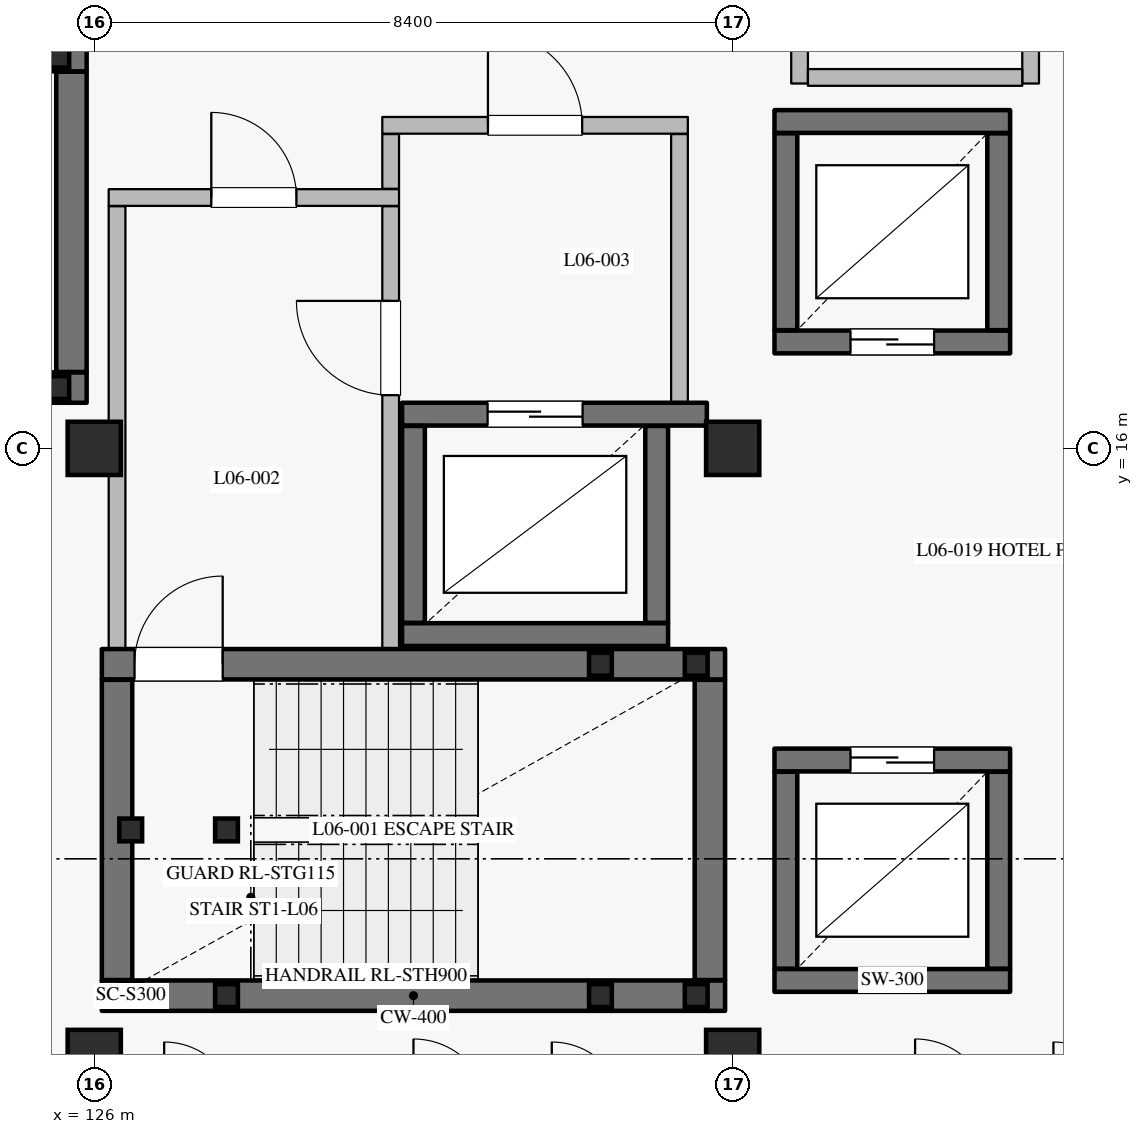
"""IFC4 building model, lengths in metres.
Left out: names, types, materials, properties, quantities, classifications, styles, units other than length and angle.
Written with IfcOpenShell. Run it as: python <this file> out.ifc"""

import sys

from ifc_helpers import new_model, si_unit, direction, frame, frame_2d, origin, origin_2d, place, context, subcontext, project, spatial, rectangle, hollow_rectangle, extrude, element, fill, save


model = new_model("IFC4")
c1 = context("Model", 3, precision=1e-05, world=origin(), true_north=direction((0.0, 1.0)))
c2 = subcontext(c1, "Body", "Model", "MODEL_VIEW")
j1 = project(units=[si_unit("LENGTHUNIT", "METRE"), si_unit("PLANEANGLEUNIT", "RADIAN")], contexts=[c1])
p1 = place(None, origin())
s1 = spatial("IfcSite", under=j1, at=p1, CompositionType="ELEMENT")
p2 = place(p1, origin())
s2 = spatial("IfcBuilding", under=s1, at=p2, CompositionType="ELEMENT")
p3 = place(p2, frame((0.0, 0.0, 28.8)))
s3 = spatial("IfcBuildingStorey", under=s2, at=p3, CompositionType="ELEMENT", Elevation=28.8)
for number, where, z_axis, x_axis in (
    (1, (126.0, 16.0, 0.0), (0.0, 0.0, 1.0), (1.0, 0.0, 0.0)),
    (2, (134.4, 16.0, 0.0), (0.0, 0.0, 1.0), (1.0, 0.0, 0.0)),
    (3, (126.0, 8.0, 0.0), (0.0, 0.0, 1.0), (1.0, 0.0, 0.0)),
    (4, (134.4, 8.0, 0.0), (0.0, 0.0, 1.0), (1.0, 0.0, 0.0)),
):
    element("IfcColumn", number, at=place(p3, frame(where, z_axis=z_axis, x_axis=x_axis)), inside=s3, PredefinedType="COLUMN", context=c2, shape_type="SweptSolid", body=[
        extrude(rectangle(XDim=0.7, YDim=0.7, at=origin_2d()), origin(), (0.0, 0.0, 1.0), 3.6),
    ])
p4 = place(p3, frame((134.95, 17.4, 0.0), z_axis=(0.0, 0.0, 1.0), x_axis=(1.0, 0.0, 0.0)))
e5 = element("IfcWall", 5, at=p4, inside=s3, PredefinedType="SHEAR", context=c2, shape_type="SweptSolid", body=[
    extrude(rectangle(XDim=3.1, YDim=0.3, at=frame_2d((1.55, 0.0))), origin(), (0.0, 0.0, 1.0), 3.365),
])
p5 = place(p4, frame((1.0, 0.0, 0.0)))
e6 = element("IfcOpeningElement", 6, at=p5, cuts=e5, PredefinedType="OPENING", context=c2, shape_type="SweptSolid", body=[
    extrude(rectangle(XDim=1.1, YDim=2.2, at=frame_2d((0.55, 1.1))), frame((0.0, 0.16, 0.0), z_axis=(0.0, -1.0, 0.0), x_axis=(1.0, 0.0, 0.0)), (0.0, 0.0, 1.0), 0.32),
])
p6 = place(p3, frame((137.9, 17.555, 0.0), z_axis=(0.0, 0.0, 1.0), x_axis=(0.0, 1.0, 0.0)))
e7 = element("IfcWall", 7, at=p6, inside=s3, PredefinedType="SHEAR", context=c2, shape_type="SweptSolid", body=[
    extrude(rectangle(XDim=2.59, YDim=0.3, at=frame_2d((1.295, 0.0))), origin(), (0.0, 0.0, 1.0), 3.365),
])
p7 = place(p3, frame((138.05, 20.3, 0.0), z_axis=(0.0, 0.0, 1.0), x_axis=(-1.0, 0.0, 0.0)))
e8 = element("IfcWall", 8, at=p7, inside=s3, PredefinedType="SHEAR", context=c2, shape_type="SweptSolid", body=[
    extrude(rectangle(XDim=3.1, YDim=0.3, at=frame_2d((1.55, 0.0))), origin(), (0.0, 0.0, 1.0), 3.365),
])
p8 = place(p3, frame((135.1, 20.145, 0.0), z_axis=(0.0, 0.0, 1.0), x_axis=(0.0, -1.0, 0.0)))
e9 = element("IfcWall", 9, at=p8, inside=s3, PredefinedType="SHEAR", context=c2, shape_type="SweptSolid", body=[
    extrude(rectangle(XDim=2.59, YDim=0.3, at=frame_2d((1.295, 0.0))), origin(), (0.0, 0.0, 1.0), 3.365),
])
p9 = place(p3, frame((134.95, 9.0, 0.0), z_axis=(0.0, 0.0, 1.0), x_axis=(1.0, 0.0, 0.0)))
e10 = element("IfcWall", 10, at=p9, inside=s3, PredefinedType="SHEAR", context=c2, shape_type="SweptSolid", body=[
    extrude(rectangle(XDim=3.1, YDim=0.3, at=frame_2d((1.55, 0.0))), origin(), (0.0, 0.0, 1.0), 3.365),
])
p10 = place(p3, frame((137.9, 9.155, 0.0), z_axis=(0.0, 0.0, 1.0), x_axis=(0.0, 1.0, 0.0)))
e11 = element("IfcWall", 11, at=p10, inside=s3, PredefinedType="SHEAR", context=c2, shape_type="SweptSolid", body=[
    extrude(rectangle(XDim=2.59, YDim=0.3, at=frame_2d((1.295, 0.0))), origin(), (0.0, 0.0, 1.0), 3.365),
])
p11 = place(p3, frame((138.05, 11.9, 0.0), z_axis=(0.0, 0.0, 1.0), x_axis=(-1.0, 0.0, 0.0)))
e12 = element("IfcWall", 12, at=p11, inside=s3, PredefinedType="SHEAR", context=c2, shape_type="SweptSolid", body=[
    extrude(rectangle(XDim=3.1, YDim=0.3, at=frame_2d((1.55, 0.0))), origin(), (0.0, 0.0, 1.0), 3.365),
])
p12 = place(p11, frame((1.0, 0.0, 0.0)))
e13 = element("IfcOpeningElement", 13, at=p12, cuts=e12, PredefinedType="OPENING", context=c2, shape_type="SweptSolid", body=[
    extrude(rectangle(XDim=1.1, YDim=2.2, at=frame_2d((0.55, 1.1))), frame((0.0, 0.16, 0.0), z_axis=(0.0, -1.0, 0.0), x_axis=(1.0, 0.0, 0.0)), (0.0, 0.0, 1.0), 0.32),
])
p13 = place(p3, frame((135.1, 11.745, 0.0), z_axis=(0.0, 0.0, 1.0), x_axis=(0.0, -1.0, 0.0)))
e14 = element("IfcWall", 14, at=p13, inside=s3, PredefinedType="SHEAR", context=c2, shape_type="SweptSolid", body=[
    extrude(rectangle(XDim=2.59, YDim=0.3, at=frame_2d((1.295, 0.0))), origin(), (0.0, 0.0, 1.0), 3.365),
])
p14 = place(p3, frame((130.05, 13.55, 0.0), z_axis=(0.0, 0.0, 1.0), x_axis=(1.0, 0.0, 0.0)))
e15 = element("IfcWall", 15, at=p14, inside=s3, PredefinedType="SHEAR", context=c2, shape_type="SweptSolid", body=[
    extrude(rectangle(XDim=3.5, YDim=0.3, at=frame_2d((1.75, 0.0))), origin(), (0.0, 0.0, 1.0), 3.365),
])
p15 = place(p3, frame((133.4, 13.705, 0.0), z_axis=(0.0, 0.0, 1.0), x_axis=(0.0, 1.0, 0.0)))
e16 = element("IfcWall", 16, at=p15, inside=s3, PredefinedType="SHEAR", context=c2, shape_type="SweptSolid", body=[
    extrude(rectangle(XDim=2.59, YDim=0.3, at=frame_2d((1.295, 0.0))), origin(), (0.0, 0.0, 1.0), 3.365),
])
p16 = place(p3, frame((134.06, 16.45, 0.0), z_axis=(0.0, 0.0, 1.0), x_axis=(-1.0, 0.0, 0.0)))
e17 = element("IfcWall", 17, at=p16, inside=s3, PredefinedType="SHEAR", context=c2, shape_type="SweptSolid", body=[
    extrude(rectangle(XDim=4.01, YDim=0.3, at=frame_2d((2.005, 0.0))), origin(), (0.0, 0.0, 1.0), 3.365),
])
p17 = place(p16, frame((1.635, 0.0, 0.0)))
e18 = element("IfcOpeningElement", 18, at=p17, cuts=e17, PredefinedType="OPENING", context=c2, shape_type="SweptSolid", body=[
    extrude(rectangle(XDim=1.25, YDim=2.25, at=frame_2d((0.625, 1.125))), frame((0.0, 0.16, 0.0), z_axis=(0.0, -1.0, 0.0), x_axis=(1.0, 0.0, 0.0)), (0.0, 0.0, 1.0), 0.32),
])
p18 = place(p3, frame((130.2, 16.295, 0.0), z_axis=(0.0, 0.0, 1.0), x_axis=(0.0, -1.0, 0.0)))
e19 = element("IfcWall", 19, at=p18, inside=s3, PredefinedType="SHEAR", context=c2, shape_type="SweptSolid", body=[
    extrude(rectangle(XDim=2.59, YDim=0.3, at=frame_2d((1.295, 0.0))), origin(), (0.0, 0.0, 1.0), 3.365),
])
p19 = place(p3, frame((126.1, 8.8, 0.0), z_axis=(0.0, 0.0, 1.0), x_axis=(1.0, 0.0, 0.0)))
e20 = element("IfcWall", 20, at=p19, inside=s3, PredefinedType="SHEAR", context=c2, shape_type="SweptSolid", body=[
    extrude(rectangle(XDim=8.2, YDim=0.4, at=frame_2d((4.1, 0.0))), origin(), (0.0, 0.0, 1.0), 3.365),
])
p20 = place(p3, frame((134.1, 9.005, 0.0), z_axis=(0.0, 0.0, 1.0), x_axis=(0.0, 1.0, 0.0)))
e21 = element("IfcWall", 21, at=p20, inside=s3, PredefinedType="SHEAR", context=c2, shape_type="SweptSolid", body=[
    extrude(rectangle(XDim=3.95, YDim=0.4, at=frame_2d((1.975, 0.0))), origin(), (0.0, 0.0, 1.0), 3.365),
])
p21 = place(p3, frame((126.1, 13.16, 0.0), z_axis=(0.0, 0.0, 1.0), x_axis=(1.0, 0.0, 0.0)))
e22 = element("IfcWall", 22, at=p21, inside=s3, PredefinedType="SHEAR", context=c2, shape_type="SweptSolid", body=[
    extrude(rectangle(XDim=8.2, YDim=0.4, at=frame_2d((4.1, 0.0))), origin(), (0.0, 0.0, 1.0), 3.365),
])
p22 = place(p21, frame((0.43, 0.0, 0.0)))
e23 = element("IfcOpeningElement", 23, at=p22, cuts=e22, PredefinedType="OPENING", context=c2, shape_type="SweptSolid", body=[
    extrude(rectangle(XDim=1.16, YDim=2.2, at=frame_2d((0.58, 1.1))), frame((0.0, 0.21, 0.0), z_axis=(0.0, -1.0, 0.0), x_axis=(1.0, 0.0, 0.0)), (0.0, 0.0, 1.0), 0.42),
])
p23 = place(p3, frame((126.3, 9.005, 0.0), z_axis=(0.0, 0.0, 1.0), x_axis=(0.0, 1.0, 0.0)))
e24 = element("IfcWall", 24, at=p23, inside=s3, PredefinedType="SHEAR", context=c2, shape_type="SweptSolid", body=[
    extrude(rectangle(XDim=3.95, YDim=0.4, at=frame_2d((1.975, 0.0))), origin(), (0.0, 0.0, 1.0), 3.365),
])
p24 = place(p3, frame((126.3, 13.365, 0.0), z_axis=(0.0, 0.0, 1.0), x_axis=(0.0, 1.0, 0.0)))
e25 = element("IfcWall", 25, at=p24, inside=s3, PredefinedType="PARTITIONING", context=c2, shape_type="SweptSolid", body=[
    extrude(rectangle(XDim=5.82, YDim=0.22, at=frame_2d((2.91, 0.0))), origin(), (0.0, 0.0, 1.0), 3.365),
])
p25 = place(p3, frame((126.19, 19.3, 0.0), z_axis=(0.0, 0.0, 1.0), x_axis=(1.0, 0.0, 0.0)))
e26 = element("IfcWall", 26, at=p25, inside=s3, PredefinedType="PARTITIONING", context=c2, shape_type="SweptSolid", body=[
    extrude(rectangle(XDim=3.82, YDim=0.22, at=frame_2d((1.91, 0.0))), origin(), (0.0, 0.0, 1.0), 3.365),
])
p26 = place(p25, frame((1.35, 0.0, 0.0)))
e27 = element("IfcOpeningElement", 27, at=p26, cuts=e26, PredefinedType="OPENING", context=c2, shape_type="SweptSolid", body=[
    extrude(rectangle(XDim=1.12, YDim=2.2, at=frame_2d((0.56, 1.1))), frame((0.0, 0.12, 0.0), z_axis=(0.0, -1.0, 0.0), x_axis=(1.0, 0.0, 0.0)), (0.0, 0.0, 1.0), 0.24),
])
p27 = place(p3, frame((129.9, 13.365, 0.0), z_axis=(0.0, 0.0, 1.0), x_axis=(0.0, 1.0, 0.0)))
e28 = element("IfcWall", 28, at=p27, inside=s3, PredefinedType="PARTITIONING", context=c2, shape_type="SweptSolid", body=[
    extrude(rectangle(XDim=5.82, YDim=0.22, at=frame_2d((2.91, 0.0))), origin(), (0.0, 0.0, 1.0), 3.365),
])
p28 = place(p27, frame((3.335, 0.0, 0.0)))
e29 = element("IfcOpeningElement", 29, at=p28, cuts=e28, PredefinedType="OPENING", context=c2, shape_type="SweptSolid", body=[
    extrude(rectangle(XDim=1.24, YDim=2.2, at=frame_2d((0.62, 1.1))), frame((0.0, 0.12, 0.0), z_axis=(0.0, -1.0, 0.0), x_axis=(1.0, 0.0, 0.0)), (0.0, 0.0, 1.0), 0.24),
])
p29 = place(p3, frame((129.9, 19.415, 0.0), z_axis=(0.0, 0.0, 1.0), x_axis=(0.0, 1.0, 0.0)))
e30 = element("IfcWall", 30, at=p29, inside=s3, PredefinedType="PARTITIONING", context=c2, shape_type="SweptSolid", body=[
    extrude(rectangle(XDim=0.72, YDim=0.22, at=frame_2d((0.36, 0.0))), origin(), (0.0, 0.0, 1.0), 3.365),
])
p30 = place(p3, frame((133.7, 16.605, 0.0), z_axis=(0.0, 0.0, 1.0), x_axis=(0.0, 1.0, 0.0)))
e31 = element("IfcWall", 31, at=p30, inside=s3, PredefinedType="PARTITIONING", context=c2, shape_type="SweptSolid", body=[
    extrude(rectangle(XDim=3.53, YDim=0.22, at=frame_2d((1.765, 0.0))), origin(), (0.0, 0.0, 1.0), 3.365),
])
p31 = place(p3, frame((129.79, 20.25, 0.0), z_axis=(0.0, 0.0, 1.0), x_axis=(1.0, 0.0, 0.0)))
e32 = element("IfcWall", 32, at=p31, inside=s3, PredefinedType="PARTITIONING", context=c2, shape_type="SweptSolid", body=[
    extrude(rectangle(XDim=4.02, YDim=0.22, at=frame_2d((2.01, 0.0))), origin(), (0.0, 0.0, 1.0), 3.365),
])
p32 = place(p31, frame((1.39, 0.0, 0.0)))
e33 = element("IfcOpeningElement", 33, at=p32, cuts=e32, PredefinedType="OPENING", context=c2, shape_type="SweptSolid", body=[
    extrude(rectangle(XDim=1.24, YDim=2.2, at=frame_2d((0.62, 1.1))), frame((0.0, 0.12, 0.0), z_axis=(0.0, -1.0, 0.0), x_axis=(1.0, 0.0, 0.0)), (0.0, 0.0, 1.0), 0.24),
])
for number, where, z_axis, x_axis in (
    (34, (126.48, 8.8, 0.0), (0.0, 0.0, 1.0), (1.0, 0.0, 0.0)),
    (35, (126.48, 10.98, 0.0), (0.0, 0.0, 1.0), (1.0, 0.0, 0.0)),
    (36, (127.74, 8.8, 0.0), (0.0, 0.0, 1.0), (1.0, 0.0, 0.0)),
    (37, (127.74, 10.98, 0.0), (0.0, 0.0, 1.0), (1.0, 0.0, 0.0)),
    (38, (132.66, 8.8, -1.8), (0.0, 0.0, 1.0), (1.0, 0.0, 0.0)),
    (39, (132.66, 13.16, -1.8), (0.0, 0.0, 1.0), (1.0, 0.0, 0.0)),
    (40, (133.92, 8.8, -1.8), (0.0, 0.0, 1.0), (1.0, 0.0, 0.0)),
    (41, (133.92, 13.16, -1.8), (0.0, 0.0, 1.0), (1.0, 0.0, 0.0)),
):
    element("IfcColumn", number, at=place(p3, frame(where, z_axis=z_axis, x_axis=x_axis)), inside=s3, PredefinedType="COLUMN", context=c2, shape_type="SweptSolid", body=[
        extrude(hollow_rectangle(XDim=0.3, YDim=0.3, WallThickness=0.012, at=origin_2d()), origin(), (0.0, 0.0, 1.0), 3.42),
    ])
p33 = place(p3, frame((117.75, 16.8, 0.0), z_axis=(0.0, 0.0, 1.0), x_axis=(1.0, 0.0, 0.0)))
e42 = element("IfcWall", 42, at=p33, inside=s3, PredefinedType="SHEAR", context=c2, shape_type="SweptSolid", body=[
    extrude(rectangle(XDim=8.15, YDim=0.4, at=frame_2d((4.075, 0.0))), origin(), (0.0, 0.0, 1.0), 3.365),
])
p34 = place(p3, frame((125.7, 17.005, 0.0), z_axis=(0.0, 0.0, 1.0), x_axis=(0.0, 1.0, 0.0)))
e43 = element("IfcWall", 43, at=p34, inside=s3, PredefinedType="SHEAR", context=c2, shape_type="SweptSolid", body=[
    extrude(rectangle(XDim=3.95, YDim=0.4, at=frame_2d((1.975, 0.0))), origin(), (0.0, 0.0, 1.0), 3.365),
])
p35 = place(p3, frame((117.75, 21.16, 0.0), z_axis=(0.0, 0.0, 1.0), x_axis=(1.0, 0.0, 0.0)))
e44 = element("IfcWall", 44, at=p35, inside=s3, PredefinedType="SHEAR", context=c2, shape_type="SweptSolid", body=[
    extrude(rectangle(XDim=8.15, YDim=0.4, at=frame_2d((4.075, 0.0))), origin(), (0.0, 0.0, 1.0), 3.365),
])
p36 = place(p35, frame((0.38, 0.0, 0.0)))
e45 = element("IfcOpeningElement", 45, at=p36, cuts=e44, PredefinedType="OPENING", context=c2, shape_type="SweptSolid", body=[
    extrude(rectangle(XDim=1.16, YDim=2.2, at=frame_2d((0.58, 1.1))), frame((0.0, 0.21, 0.0), z_axis=(0.0, -1.0, 0.0), x_axis=(1.0, 0.0, 0.0)), (0.0, 0.0, 1.0), 0.42),
])
for number, where, z_axis, x_axis in (
    (46, (125.52, 16.8, -1.8), (0.0, 0.0, 1.0), (1.0, 0.0, 0.0)),
    (47, (125.52, 21.16, -1.8), (0.0, 0.0, 1.0), (1.0, 0.0, 0.0)),
):
    element("IfcColumn", number, at=place(p3, frame(where, z_axis=z_axis, x_axis=x_axis)), inside=s3, PredefinedType="COLUMN", context=c2, shape_type="SweptSolid", body=[
        extrude(hollow_rectangle(XDim=0.3, YDim=0.3, WallThickness=0.012, at=origin_2d()), origin(), (0.0, 0.0, 1.0), 3.42),
    ])
for number, where, z_axis, x_axis in (
    (48, (135.28, 20.8, 0.0), (0.0, 0.0, 1.0), (0.0, 1.0, 0.0)),
    (49, (138.32, 20.8, 0.0), (0.0, 0.0, 1.0), (0.0, 1.0, 0.0)),
):
    element("IfcWall", number, at=place(p3, frame(where, z_axis=z_axis, x_axis=x_axis)), inside=s3, PredefinedType="PARTITIONING", context=c2, shape_type="SweptSolid", body=[
        extrude(rectangle(XDim=2.748, YDim=0.22, at=frame_2d((1.374, 0.0))), origin(), (0.0, 0.0, 1.0), 3.365),
    ])
p37 = place(p3, frame((135.39, 20.88, 0.0), z_axis=(0.0, 0.0, 1.0), x_axis=(1.0, 0.0, 0.0)))
e50 = element("IfcWall", 50, at=p37, inside=s3, PredefinedType="PARTITIONING", context=c2, shape_type="SweptSolid", body=[
    extrude(rectangle(XDim=2.82, YDim=0.22, at=frame_2d((1.41, 0.0))), origin(), (0.0, 0.0, 1.0), 3.365),
])
p38 = place(p5, origin())
e51 = element("IfcDoor", 51, at=p38, inside=s3, OperationType="DOUBLE_DOOR_SLIDING", PredefinedType="DOOR", context=c2, shape_type="SweptSolid", body=[
    extrude(rectangle(XDim=1.1, YDim=2.2, at=frame_2d((0.55, 1.1))), frame((0.0, 0.025, 0.0), z_axis=(0.0, -1.0, 0.0), x_axis=(1.0, 0.0, 0.0)), (0.0, 0.0, 1.0), 0.05),
])
fill(e6, e51)
p39 = place(p12, origin())
e52 = element("IfcDoor", 52, at=p39, inside=s3, OperationType="DOUBLE_DOOR_SLIDING", PredefinedType="DOOR", context=c2, shape_type="SweptSolid", body=[
    extrude(rectangle(XDim=1.1, YDim=2.2, at=frame_2d((0.55, 1.1))), frame((0.0, 0.025, 0.0), z_axis=(0.0, -1.0, 0.0), x_axis=(1.0, 0.0, 0.0)), (0.0, 0.0, 1.0), 0.05),
])
fill(e13, e52)
p40 = place(p17, origin())
e53 = element("IfcDoor", 53, at=p40, inside=s3, OperationType="DOUBLE_DOOR_SLIDING", PredefinedType="DOOR", context=c2, shape_type="SweptSolid", body=[
    extrude(rectangle(XDim=1.25, YDim=2.25, at=frame_2d((0.625, 1.125))), frame((0.0, 0.025, 0.0), z_axis=(0.0, -1.0, 0.0), x_axis=(1.0, 0.0, 0.0)), (0.0, 0.0, 1.0), 0.05),
])
fill(e18, e53)
p41 = place(p22, origin())
e54 = element("IfcDoor", 54, at=p41, inside=s3, OperationType="SINGLE_SWING_RIGHT", PredefinedType="DOOR", context=c2, shape_type="SweptSolid", body=[
    extrude(rectangle(XDim=1.16, YDim=2.2, at=frame_2d((0.58, 1.1))), frame((0.0, 0.025, 0.0), z_axis=(0.0, -1.0, 0.0), x_axis=(1.0, 0.0, 0.0)), (0.0, 0.0, 1.0), 0.05),
])
fill(e23, e54)
p42 = place(p26, origin())
e55 = element("IfcDoor", 55, at=p42, inside=s3, OperationType="SINGLE_SWING_LEFT", PredefinedType="DOOR", context=c2, shape_type="SweptSolid", body=[
    extrude(rectangle(XDim=1.12, YDim=2.2, at=frame_2d((0.56, 1.1))), frame((0.0, 0.025, 0.0), z_axis=(0.0, -1.0, 0.0), x_axis=(1.0, 0.0, 0.0)), (0.0, 0.0, 1.0), 0.05),
])
fill(e27, e55)
p43 = place(p28, origin())
e56 = element("IfcDoor", 56, at=p43, inside=s3, OperationType="SINGLE_SWING_RIGHT", PredefinedType="DOOR", context=c2, shape_type="SweptSolid", body=[
    extrude(rectangle(XDim=1.24, YDim=2.2, at=frame_2d((0.62, 1.1))), frame((0.0, 0.025, 0.0), z_axis=(0.0, -1.0, 0.0), x_axis=(1.0, 0.0, 0.0)), (0.0, 0.0, 1.0), 0.05),
])
fill(e29, e56)
p44 = place(p32, origin())
e57 = element("IfcDoor", 57, at=p44, inside=s3, OperationType="SINGLE_SWING_LEFT", PredefinedType="DOOR", context=c2, shape_type="SweptSolid", body=[
    extrude(rectangle(XDim=1.24, YDim=2.2, at=frame_2d((0.62, 1.1))), frame((0.0, 0.025, 0.0), z_axis=(0.0, -1.0, 0.0), x_axis=(1.0, 0.0, 0.0)), (0.0, 0.0, 1.0), 0.05),
])
fill(e33, e57)
save(model, sys.argv[1])
